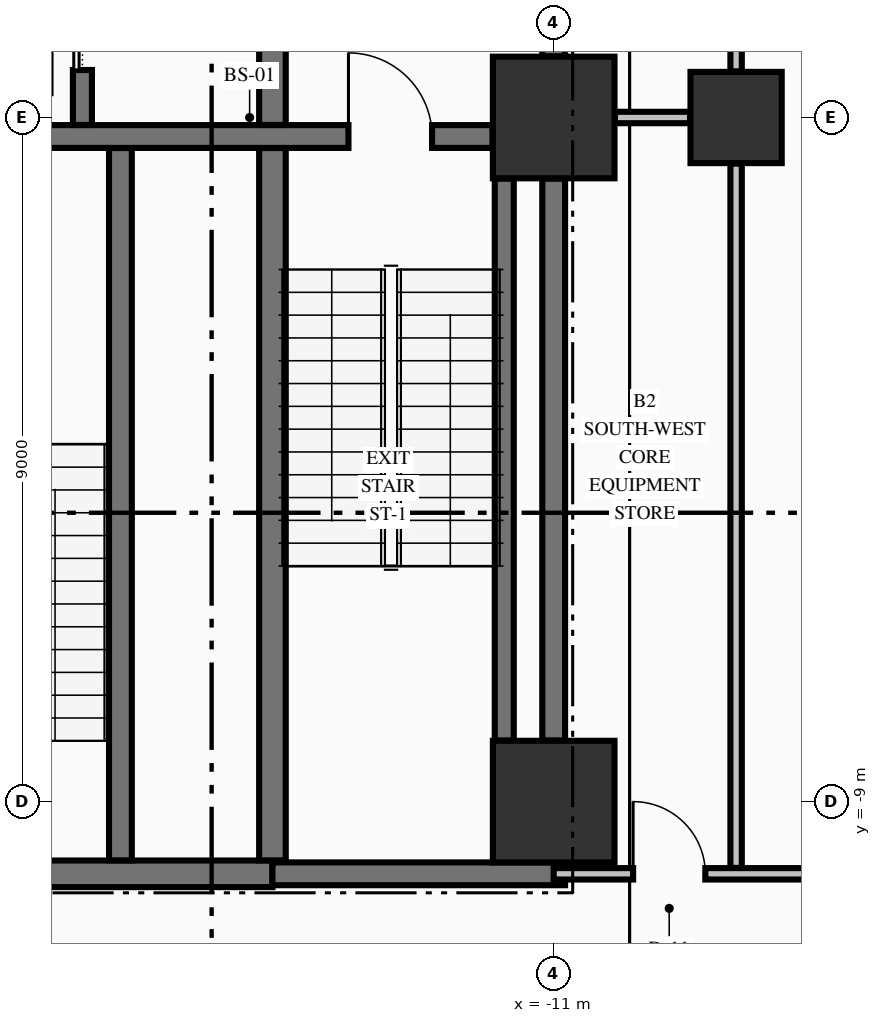
"""IFC4 building model, lengths in metres.
Left out: names, types, materials, properties, quantities, classifications, styles, units other than length and angle.
Written with IfcOpenShell. Run it as: python <this file> out.ifc"""

import sys

from ifc_helpers import new_model, si_unit, direction, frame, frame_2d, origin, origin_2d, place, context, subcontext, project, spatial, rectangle, extrude, element, fill, save


model = new_model("IFC4")
c1 = context("Model", 3, precision=1e-05, world=origin(), true_north=direction((0.0, 1.0)))
c2 = subcontext(c1, "Body", "Model", "MODEL_VIEW")
j1 = project(units=[si_unit("LENGTHUNIT", "METRE"), si_unit("PLANEANGLEUNIT", "RADIAN")], contexts=[c1])
p1 = place(None, origin())
s1 = spatial("IfcSite", under=j1, at=p1, CompositionType="ELEMENT")
p2 = place(p1, origin())
s2 = spatial("IfcBuilding", under=s1, at=p2, CompositionType="ELEMENT")
p3 = place(p2, frame((0.0, 0.0, -9.1)))
s3 = spatial("IfcBuildingStorey", under=s2, at=p3, CompositionType="ELEMENT", Elevation=-9.1)
for number, where, z_axis, x_axis in (
    (1, (-11.0, -9.0, -0.45), (0.0, 0.0, 1.0), (1.0, 0.0, 0.0)),
    (2, (-11.0, 0.0, -0.45), (0.0, 0.0, 1.0), (1.0, 0.0, 0.0)),
):
    element("IfcColumn", number, at=place(p3, frame(where, z_axis=z_axis, x_axis=x_axis)), inside=s3, PredefinedType="COLUMN", context=c2, shape_type="SweptSolid", body=[
        extrude(rectangle(XDim=1.6, YDim=1.6, at=origin_2d()), origin(), (0.0, 0.0, 1.0), 4.65),
    ])
p4 = place(p3, frame((-8.6, 0.0, -0.45), z_axis=(0.0, 0.0, 1.0), x_axis=(1.0, 0.0, 0.0)))
e3 = element("IfcColumn", 3, at=p4, inside=s3, PredefinedType="COLUMN", context=c2, shape_type="SweptSolid", body=[
    extrude(rectangle(XDim=1.2, YDim=1.2, at=origin_2d()), origin(), (0.0, 0.0, 1.0), 4.65),
])
p5 = place(p3, frame((-19.196, -9.95, 0.0), z_axis=(0.0, 0.0, 1.0), x_axis=(1.0, 0.0, 0.0)))
e4 = element("IfcWall", 4, at=p5, inside=s3, PredefinedType="SHEAR", context=c2, shape_type="SweptSolid", body=[
    extrude(rectangle(XDim=4.496, YDim=0.35, at=frame_2d((2.248, 0.0))), origin(), (0.0, 0.0, 1.0), 4.2),
])
p6 = place(p5, frame((0.371, 0.0, 0.0)))
e5 = element("IfcOpeningElement", 5, at=p6, cuts=e4, PredefinedType="OPENING", context=c2, shape_type="SweptSolid", body=[
    extrude(rectangle(XDim=1.05, YDim=2.15, at=frame_2d((0.525, 1.075))), frame((0.0, 0.185, 0.0), z_axis=(0.0, -1.0, 0.0), x_axis=(1.0, 0.0, 0.0)), (0.0, 0.0, 1.0), 0.37),
])
p7 = place(p3, frame((-14.7, -9.95, 0.0), z_axis=(0.0, 0.0, 1.0), x_axis=(1.0, 0.0, 0.0)))
e6 = element("IfcWall", 6, at=p7, inside=s3, PredefinedType="SHEAR", context=c2, shape_type="SweptSolid", body=[
    extrude(rectangle(XDim=3.85, YDim=0.3, at=frame_2d((1.925, 0.0))), origin(), (0.0, 0.0, 1.0), 4.2),
])
p8 = place(p3, frame((-19.196, -0.25, 0.0), z_axis=(0.0, 0.0, 1.0), x_axis=(1.0, 0.0, 0.0)))
e7 = element("IfcWall", 7, at=p8, inside=s3, PredefinedType="SHEAR", context=c2, shape_type="SweptSolid", body=[
    extrude(rectangle(XDim=7.392, YDim=0.3, at=frame_2d((3.696, 0.0))), origin(), (0.0, 0.0, 1.0), 4.2),
])
p9 = place(p8, frame((5.496, 0.0, 0.0)))
e8 = element("IfcOpeningElement", 8, at=p9, cuts=e7, PredefinedType="OPENING", context=c2, shape_type="SweptSolid", body=[
    extrude(rectangle(XDim=1.1, YDim=2.15, at=frame_2d((0.55, 1.075))), frame((0.0, 0.16, 0.0), z_axis=(0.0, -1.0, 0.0), x_axis=(1.0, 0.0, 0.0)), (0.0, 0.0, 1.0), 0.32),
])
p10 = place(p3, frame((-11.0, -9.95, 0.0), z_axis=(0.0, 0.0, 1.0), x_axis=(1.0, 0.0, 0.0)))
e9 = element("IfcWall", 9, at=p10, inside=s3, PredefinedType="PARTITIONING", context=c2, shape_type="SweptSolid", body=[
    extrude(rectangle(XDim=22.0, YDim=0.15, at=frame_2d((11.0, 0.0))), origin(), (0.0, 0.0, 1.0), 4.2),
])
p11 = place(p10, frame((1.045, 0.0, 0.0)))
e10 = element("IfcOpeningElement", 10, at=p11, cuts=e9, PredefinedType="OPENING", context=c2, shape_type="SweptSolid", body=[
    extrude(rectangle(XDim=0.95, YDim=2.15, at=frame_2d((0.475, 1.075))), frame((0.0, 0.085, 0.0), z_axis=(0.0, -1.0, 0.0), x_axis=(1.0, 0.0, 0.0)), (0.0, 0.0, 1.0), 0.17),
])
p12 = place(p10, frame((20.005, 0.0, 0.0)))
e11 = element("IfcOpeningElement", 11, at=p12, cuts=e9, PredefinedType="OPENING", context=c2, shape_type="SweptSolid", body=[
    extrude(rectangle(XDim=0.95, YDim=2.15, at=frame_2d((0.475, 1.075))), frame((0.0, 0.085, 0.0), z_axis=(0.0, -1.0, 0.0), x_axis=(1.0, 0.0, 0.0)), (0.0, 0.0, 1.0), 0.17),
])
p13 = place(p3, frame((-10.194, 0.0, 0.0), z_axis=(0.0, 0.0, 1.0), x_axis=(1.0, 0.0, 0.0)))
e12 = element("IfcWall", 12, at=p13, inside=s3, PredefinedType="PARTITIONING", context=c2, shape_type="SweptSolid", body=[
    extrude(rectangle(XDim=0.988, YDim=0.15, at=frame_2d((0.494, 0.0))), origin(), (0.0, 0.0, 1.0), 3.242),
])
p14 = place(p3, frame((-17.2, -0.098, 0.0), z_axis=(0.0, 0.0, 1.0), x_axis=(0.0, 1.0, 0.0)))
e13 = element("IfcWall", 13, at=p14, inside=s3, PredefinedType="SOLIDWALL", context=c2, shape_type="SweptSolid", body=[
    extrude(rectangle(XDim=2.571, YDim=0.25, at=frame_2d((1.285, 0.0))), origin(), (0.0, 0.0, 1.0), 4.2),
])
p15 = place(p14, frame((0.723, 0.0, 0.0)))
e14 = element("IfcOpeningElement", 14, at=p15, cuts=e13, PredefinedType="OPENING", context=c2, shape_type="SweptSolid", body=[
    extrude(rectangle(XDim=1.1, YDim=2.2, at=frame_2d((0.55, 1.1))), frame((0.0, 0.135, 0.0), z_axis=(0.0, -1.0, 0.0), x_axis=(1.0, 0.0, 0.0)), (0.0, 0.0, 1.0), 0.27),
])
p16 = place(p3, frame((-16.7, -9.773, 0.0), z_axis=(0.0, 0.0, 1.0), x_axis=(0.0, 1.0, 0.0)))
e15 = element("IfcWall", 15, at=p16, inside=s3, PredefinedType="SHEAR", context=c2, shape_type="SweptSolid", body=[
    extrude(rectangle(XDim=9.371, YDim=0.3, at=frame_2d((4.686, 0.0))), origin(), (0.0, 0.0, 1.0), 4.2),
])
p17 = place(p3, frame((-14.7, -9.773, 0.0), z_axis=(0.0, 0.0, 1.0), x_axis=(0.0, 1.0, 0.0)))
e16 = element("IfcWall", 16, at=p17, inside=s3, PredefinedType="SHEAR", context=c2, shape_type="SweptSolid", body=[
    extrude(rectangle(XDim=9.371, YDim=0.35, at=frame_2d((4.686, 0.0))), origin(), (0.0, 0.0, 1.0), 4.2),
])
p18 = place(p3, frame((-14.7, -0.098, 0.0), z_axis=(0.0, 0.0, 1.0), x_axis=(0.0, 1.0, 0.0)))
e17 = element("IfcWall", 17, at=p18, inside=s3, PredefinedType="SHEAR", context=c2, shape_type="SweptSolid", body=[
    extrude(rectangle(XDim=2.846, YDim=0.35, at=frame_2d((1.423, 0.0))), origin(), (0.0, 0.0, 1.0), 4.2),
])
p19 = place(p3, frame((-11.65, -8.196, 0.0), z_axis=(0.0, 0.0, 1.0), x_axis=(0.0, 1.0, 0.0)))
e18 = element("IfcWall", 18, at=p19, inside=s3, PredefinedType="SOLIDWALL", context=c2, shape_type="SweptSolid", body=[
    extrude(rectangle(XDim=7.392, YDim=0.25, at=frame_2d((3.696, 0.0))), origin(), (0.0, 0.0, 1.0), 4.2),
])
p20 = place(p3, frame((-11.0, -8.196, 0.0), z_axis=(0.0, 0.0, 1.0), x_axis=(0.0, 1.0, 0.0)))
e19 = element("IfcWall", 19, at=p20, inside=s3, PredefinedType="SHEAR", context=c2, shape_type="SweptSolid", body=[
    extrude(rectangle(XDim=7.392, YDim=0.3, at=frame_2d((3.696, 0.0))), origin(), (0.0, 0.0, 1.0), 4.2),
])
p21 = place(p3, frame((-11.0, 0.804, 0.0), z_axis=(0.0, 0.0, 1.0), x_axis=(0.0, 1.0, 0.0)))
e20 = element("IfcWall", 20, at=p21, inside=s3, PredefinedType="SHEAR", context=c2, shape_type="SweptSolid", body=[
    extrude(rectangle(XDim=1.944, YDim=0.3, at=frame_2d((0.972, 0.0))), origin(), (0.0, 0.0, 1.0), 4.2),
])
p22 = place(p21, frame((0.296, 0.0, 0.0)))
e21 = element("IfcOpeningElement", 21, at=p22, cuts=e20, PredefinedType="OPENING", context=c2, shape_type="SweptSolid", body=[
    extrude(rectangle(XDim=1.1, YDim=2.15, at=frame_2d((0.55, 1.075))), frame((0.0, 0.16, 0.0), z_axis=(0.0, -1.0, 0.0), x_axis=(1.0, 0.0, 0.0)), (0.0, 0.0, 1.0), 0.32),
])
p23 = place(p3, frame((-8.6, -9.872, 0.0), z_axis=(0.0, 0.0, 1.0), x_axis=(0.0, 1.0, 0.0)))
e22 = element("IfcWall", 22, at=p23, inside=s3, PredefinedType="PARTITIONING", context=c2, shape_type="SweptSolid", body=[
    extrude(rectangle(XDim=9.266, YDim=0.15, at=frame_2d((4.633, 0.0))), origin(), (0.0, 0.0, 1.0), 4.2),
])
p24 = place(p3, frame((-8.6, 0.606, 0.0), z_axis=(0.0, 0.0, 1.0), x_axis=(0.0, 1.0, 0.0)))
e23 = element("IfcWall", 23, at=p24, inside=s3, PredefinedType="PARTITIONING", context=c2, shape_type="SweptSolid", body=[
    extrude(rectangle(XDim=9.816, YDim=0.15, at=frame_2d((4.908, 0.0))), origin(), (0.0, 0.0, 1.0), 3.242),
])
p25 = place(p24, frame((3.344, 0.0, 0.0)))
e24 = element("IfcOpeningElement", 24, at=p25, cuts=e23, PredefinedType="OPENING", context=c2, shape_type="SweptSolid", body=[
    extrude(rectangle(XDim=1.1, YDim=2.15, at=frame_2d((0.55, 1.075))), frame((0.0, 0.085, 0.0), z_axis=(0.0, -1.0, 0.0), x_axis=(1.0, 0.0, 0.0)), (0.0, 0.0, 1.0), 0.17),
])
p26 = place(p9, origin())
e25 = element("IfcDoor", 25, at=p26, inside=s3, OperationType="SINGLE_SWING_LEFT", PredefinedType="DOOR", context=c2, shape_type="SweptSolid", body=[
    extrude(rectangle(XDim=1.1, YDim=2.15, at=frame_2d((0.55, 1.075))), frame((0.0, 0.025, 0.0), z_axis=(0.0, -1.0, 0.0), x_axis=(1.0, 0.0, 0.0)), (0.0, 0.0, 1.0), 0.05),
])
fill(e8, e25)
p27 = place(p15, origin())
e26 = element("IfcDoor", 26, at=p27, inside=s3, OperationType="SLIDING_TO_LEFT", PredefinedType="DOOR", context=c2, shape_type="SweptSolid", body=[
    extrude(rectangle(XDim=1.1, YDim=2.2, at=frame_2d((0.55, 1.1))), frame((0.0, 0.025, 0.0), z_axis=(0.0, -1.0, 0.0), x_axis=(1.0, 0.0, 0.0)), (0.0, 0.0, 1.0), 0.05),
])
fill(e14, e26)
p28 = place(p11, origin())
e27 = element("IfcDoor", 27, at=p28, inside=s3, OperationType="SINGLE_SWING_LEFT", PredefinedType="DOOR", context=c2, shape_type="SweptSolid", body=[
    extrude(rectangle(XDim=0.95, YDim=2.15, at=frame_2d((0.475, 1.075))), frame((0.0, 0.025, 0.0), z_axis=(0.0, -1.0, 0.0), x_axis=(1.0, 0.0, 0.0)), (0.0, 0.0, 1.0), 0.05),
])
fill(e10, e27)
save(model, sys.argv[1])
